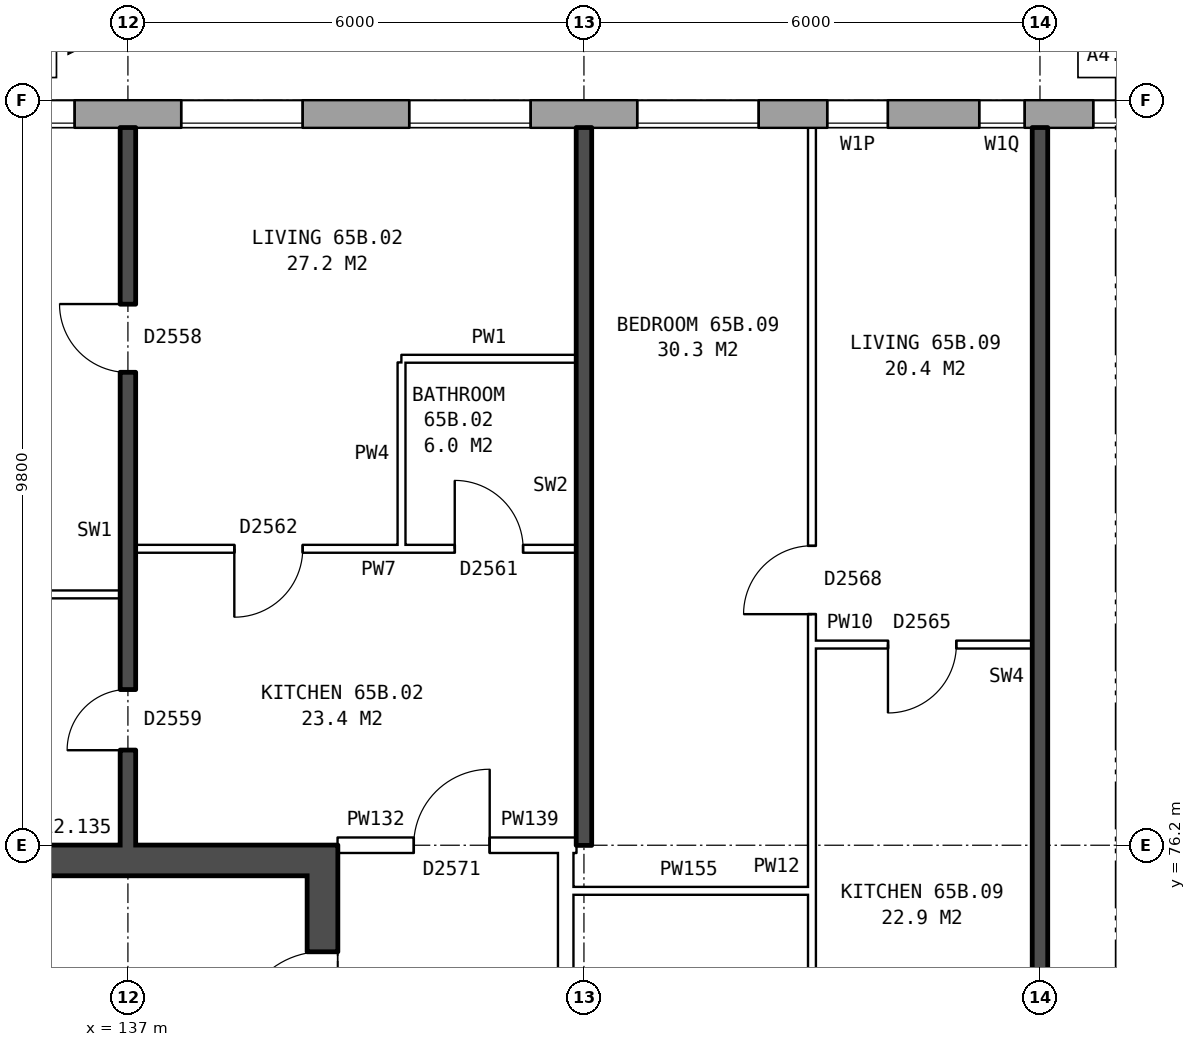
"""IFC4 building model, lengths in metres.
Left out: names, types, materials, properties, quantities, classifications, styles, units other than length and angle.
Written with IfcOpenShell. Run it as: python <this file> out.ifc"""

import sys

from ifc_helpers import new_model, si_unit, direction, frame, frame_2d, origin, place, context, subcontext, project, spatial, rectangle, extrude, element, fill, save


model = new_model("IFC4")
c1 = context("Model", 3, precision=1e-05, world=origin(), true_north=direction((0.0, 1.0)))
c2 = subcontext(c1, "Body", "Model", "MODEL_VIEW")
j1 = project(units=[si_unit("LENGTHUNIT", "METRE"), si_unit("PLANEANGLEUNIT", "RADIAN")], contexts=[c1])
p1 = place(None, origin())
s1 = spatial("IfcSite", under=j1, at=p1, CompositionType="ELEMENT")
p2 = place(p1, origin())
s2 = spatial("IfcBuilding", under=s1, at=p2, CompositionType="ELEMENT")
p3 = place(p2, frame((0.0, 0.0, 230.7)))
s3 = spatial("IfcBuildingStorey", under=s2, at=p3, CompositionType="ELEMENT", Elevation=230.7)
p4 = place(p3, frame((165.925, 85.82, 0.0), z_axis=(0.0, 0.0, 1.0), x_axis=(-1.0, 0.0, 0.0)))
e1 = element("IfcWall", 1, at=p4, inside=s3, PredefinedType="STANDARD", context=c2, shape_type="SweptSolid", body=[
    extrude(rectangle(XDim=33.875, YDim=0.36, at=frame_2d((16.938, 0.0))), origin(), (0.0, 0.0, 1.0), 2.85),
])
p5 = place(p4, frame((2.625, 0.0, 0.8)))
e2 = element("IfcOpeningElement", 2, at=p5, cuts=e1, PredefinedType="OPENING", context=c2, shape_type="SweptSolid", body=[
    extrude(rectangle(XDim=1.6, YDim=1.8, at=frame_2d((0.8, 0.9))), frame((0.0, 0.19, 0.0), z_axis=(0.0, -1.0, 0.0), x_axis=(1.0, 0.0, 0.0)), (0.0, 0.0, 1.0), 0.38),
])
p6 = place(p4, frame((5.625, 0.0, 0.8)))
e3 = element("IfcOpeningElement", 3, at=p6, cuts=e1, PredefinedType="OPENING", context=c2, shape_type="SweptSolid", body=[
    extrude(rectangle(XDim=1.6, YDim=1.8, at=frame_2d((0.8, 0.9))), frame((0.0, 0.19, 0.0), z_axis=(0.0, -1.0, 0.0), x_axis=(1.0, 0.0, 0.0)), (0.0, 0.0, 1.0), 0.38),
])
p7 = place(p4, frame((8.625, 0.0, 0.8)))
e4 = element("IfcOpeningElement", 4, at=p7, cuts=e1, PredefinedType="OPENING", context=c2, shape_type="SweptSolid", body=[
    extrude(rectangle(XDim=1.6, YDim=1.8, at=frame_2d((0.8, 0.9))), frame((0.0, 0.19, 0.0), z_axis=(0.0, -1.0, 0.0), x_axis=(1.0, 0.0, 0.0)), (0.0, 0.0, 1.0), 0.38),
])
p8 = place(p4, frame((11.125, 0.0, 0.8)))
e5 = element("IfcOpeningElement", 5, at=p8, cuts=e1, PredefinedType="OPENING", context=c2, shape_type="SweptSolid", body=[
    extrude(rectangle(XDim=1.4, YDim=1.8, at=frame_2d((0.7, 0.9))), frame((0.0, 0.19, 0.0), z_axis=(0.0, -1.0, 0.0), x_axis=(1.0, 0.0, 0.0)), (0.0, 0.0, 1.0), 0.38),
])
p9 = place(p4, frame((14.625, 0.0, 0.8)))
e6 = element("IfcOpeningElement", 6, at=p9, cuts=e1, PredefinedType="OPENING", context=c2, shape_type="SweptSolid", body=[
    extrude(rectangle(XDim=1.6, YDim=1.8, at=frame_2d((0.8, 0.9))), frame((0.0, 0.19, 0.0), z_axis=(0.0, -1.0, 0.0), x_axis=(1.0, 0.0, 0.0)), (0.0, 0.0, 1.0), 0.38),
])
p10 = place(p4, frame((17.125, 0.0, 0.25)))
e7 = element("IfcOpeningElement", 7, at=p10, cuts=e1, PredefinedType="OPENING", context=c2, shape_type="SweptSolid", body=[
    extrude(rectangle(XDim=0.6, YDim=1.2, at=frame_2d((0.3, 0.6))), frame((0.0, 0.19, 0.0), z_axis=(0.0, -1.0, 0.0), x_axis=(1.0, 0.0, 0.0)), (0.0, 0.0, 1.0), 0.38),
])
p11 = place(p4, frame((20.625, 0.0, 0.8)))
e8 = element("IfcOpeningElement", 8, at=p11, cuts=e1, PredefinedType="OPENING", context=c2, shape_type="SweptSolid", body=[
    extrude(rectangle(XDim=1.6, YDim=1.8, at=frame_2d((0.8, 0.9))), frame((0.0, 0.19, 0.0), z_axis=(0.0, -1.0, 0.0), x_axis=(1.0, 0.0, 0.0)), (0.0, 0.0, 1.0), 0.38),
])
p12 = place(p4, frame((23.625, 0.0, 0.8)))
e9 = element("IfcOpeningElement", 9, at=p12, cuts=e1, PredefinedType="OPENING", context=c2, shape_type="SweptSolid", body=[
    extrude(rectangle(XDim=1.6, YDim=1.8, at=frame_2d((0.8, 0.9))), frame((0.0, 0.19, 0.0), z_axis=(0.0, -1.0, 0.0), x_axis=(1.0, 0.0, 0.0)), (0.0, 0.0, 1.0), 0.38),
])
p13 = place(p4, frame((26.625, 0.0, 0.8)))
e10 = element("IfcOpeningElement", 10, at=p13, cuts=e1, PredefinedType="OPENING", context=c2, shape_type="SweptSolid", body=[
    extrude(rectangle(XDim=1.6, YDim=1.8, at=frame_2d((0.8, 0.9))), frame((0.0, 0.19, 0.0), z_axis=(0.0, -1.0, 0.0), x_axis=(1.0, 0.0, 0.0)), (0.0, 0.0, 1.0), 0.38),
])
p14 = place(p4, frame((29.625, 0.0, 0.8)))
e11 = element("IfcOpeningElement", 11, at=p14, cuts=e1, PredefinedType="OPENING", context=c2, shape_type="SweptSolid", body=[
    extrude(rectangle(XDim=1.6, YDim=1.8, at=frame_2d((0.8, 0.9))), frame((0.0, 0.19, 0.0), z_axis=(0.0, -1.0, 0.0), x_axis=(1.0, 0.0, 0.0)), (0.0, 0.0, 1.0), 0.38),
])
p15 = place(p4, frame((18.925, 0.0, 1.35)))
e12 = element("IfcOpeningElement", 12, at=p15, cuts=e1, PredefinedType="OPENING", context=c2, shape_type="SweptSolid", body=[
    extrude(rectangle(XDim=0.8, YDim=1.2, at=frame_2d((0.4, 0.6))), frame((0.0, 0.19, 0.0), z_axis=(0.0, -1.0, 0.0), x_axis=(1.0, 0.0, 0.0)), (0.0, 0.0, 1.0), 0.38),
])
p16 = place(p3, frame((139.56, 63.8, 0.0), z_axis=(0.0, 0.0, 1.0), x_axis=(0.0, 1.0, 0.0)))
e13 = element("IfcWall", 13, at=p16, inside=s3, PredefinedType="SHEAR", context=c2, shape_type="SweptSolid", body=[
    extrude(rectangle(XDim=12.4, YDim=0.4, at=frame_2d((6.2, 0.0))), origin(), (0.0, 0.0, 1.0), 2.85),
])
p17 = place(p16, frame((1.325, 0.0, 0.0)))
e14 = element("IfcOpeningElement", 14, at=p17, cuts=e13, PredefinedType="OPENING", context=c2, shape_type="SweptSolid", body=[
    extrude(rectangle(XDim=1.1, YDim=2.1, at=frame_2d((0.55, 1.05))), frame((0.0, 0.21, 0.0), z_axis=(0.0, -1.0, 0.0), x_axis=(1.0, 0.0, 0.0)), (0.0, 0.0, 1.0), 0.42),
])
p18 = place(p16, frame((3.6, 0.0, 0.0)))
e15 = element("IfcOpeningElement", 15, at=p18, cuts=e13, PredefinedType="OPENING", context=c2, shape_type="SweptSolid", body=[
    extrude(rectangle(XDim=1.1, YDim=2.1, at=frame_2d((0.55, 1.05))), frame((0.0, 0.21, 0.0), z_axis=(0.0, -1.0, 0.0), x_axis=(1.0, 0.0, 0.0)), (0.0, 0.0, 1.0), 0.42),
])
p19 = place(p16, frame((5.8, 0.0, 0.0)))
e16 = element("IfcOpeningElement", 16, at=p19, cuts=e13, PredefinedType="OPENING", context=c2, shape_type="SweptSolid", body=[
    extrude(rectangle(XDim=1.1, YDim=2.1, at=frame_2d((0.55, 1.05))), frame((0.0, 0.21, 0.0), z_axis=(0.0, -1.0, 0.0), x_axis=(1.0, 0.0, 0.0)), (0.0, 0.0, 1.0), 0.42),
])
p20 = place(p16, frame((9.9, 0.0, 0.0)))
e17 = element("IfcOpeningElement", 17, at=p20, cuts=e13, PredefinedType="OPENING", context=c2, shape_type="SweptSolid", body=[
    extrude(rectangle(XDim=1.1, YDim=2.1, at=frame_2d((0.55, 1.05))), frame((0.0, 0.21, 0.0), z_axis=(0.0, -1.0, 0.0), x_axis=(1.0, 0.0, 0.0)), (0.0, 0.0, 1.0), 0.42),
])
p21 = place(p16, frame((8.125, 0.0, 0.0)))
e18 = element("IfcOpeningElement", 18, at=p21, cuts=e13, PredefinedType="OPENING", context=c2, shape_type="SweptSolid", body=[
    extrude(rectangle(XDim=0.85, YDim=2.1, at=frame_2d((0.425, 1.05))), frame((0.0, 0.21, 0.0), z_axis=(0.0, -1.0, 0.0), x_axis=(1.0, 0.0, 0.0)), (0.0, 0.0, 1.0), 0.42),
])
p22 = place(p3, frame((139.36, 76.0, 0.0), z_axis=(0.0, 0.0, 1.0), x_axis=(-1.0, 0.0, 0.0)))
e19 = element("IfcWall", 19, at=p22, inside=s3, PredefinedType="SHEAR", context=c2, shape_type="SweptSolid", body=[
    extrude(rectangle(XDim=7.6, YDim=0.4, at=frame_2d((3.8, 0.0))), origin(), (0.0, 0.0, 1.0), 2.85),
])
p23 = place(p3, frame((142.76, 63.9, 0.0), z_axis=(0.0, 0.0, 1.0), x_axis=(0.0, 1.0, 0.0)))
e20 = element("IfcWall", 20, at=p23, inside=s3, PredefinedType="PARTITIONING", context=c2, shape_type="SweptSolid", body=[
    extrude(rectangle(XDim=12.2, YDim=0.2, at=frame_2d((6.1, 0.0))), origin(), (0.0, 0.0, 1.0), 2.85),
])
p24 = place(p23, frame((5.1, 0.0, 0.0)))
e21 = element("IfcOpeningElement", 21, at=p24, cuts=e20, PredefinedType="OPENING", context=c2, shape_type="SweptSolid", body=[
    extrude(rectangle(XDim=2.0, YDim=2.1, at=frame_2d((1.0, 1.05))), frame((0.0, 0.11, 0.0), z_axis=(0.0, -1.0, 0.0), x_axis=(1.0, 0.0, 0.0)), (0.0, 0.0, 1.0), 0.22),
])
p25 = place(p3, frame((142.76, 75.6, 0.0), z_axis=(0.0, 0.0, 1.0), x_axis=(1.0, 0.0, 0.0)))
e22 = element("IfcWall", 22, at=p25, inside=s3, PredefinedType="PARTITIONING", context=c2, shape_type="SweptSolid", body=[
    extrude(rectangle(XDim=3.24, YDim=0.1, at=frame_2d((1.62, 0.0))), origin(), (0.0, 0.0, 1.0), 2.85),
])
p26 = place(p3, frame((139.76, 76.2, 0.0), z_axis=(0.0, 0.0, 1.0), x_axis=(1.0, 0.0, 0.0)))
e23 = element("IfcWall", 23, at=p26, inside=s3, PredefinedType="PARTITIONING", context=c2, shape_type="SweptSolid", body=[
    extrude(rectangle(XDim=3.0, YDim=0.2, at=frame_2d((1.5, 0.0))), origin(), (0.0, 0.0, 1.0), 2.85),
])
p27 = place(p26, frame((1.0, 0.0, 0.0)))
e24 = element("IfcOpeningElement", 24, at=p27, cuts=e23, PredefinedType="OPENING", context=c2, shape_type="SweptSolid", body=[
    extrude(rectangle(XDim=1.0, YDim=2.1, at=frame_2d((0.5, 1.05))), frame((0.0, 0.11, 0.0), z_axis=(0.0, -1.0, 0.0), x_axis=(1.0, 0.0, 0.0)), (0.0, 0.0, 1.0), 0.22),
])
p28 = place(p3, frame((142.76, 76.2, 0.0), z_axis=(0.0, 0.0, 1.0), x_axis=(1.0, 0.0, 0.0)))
e25 = element("IfcWall", 25, at=p28, inside=s3, PredefinedType="PARTITIONING", context=c2, shape_type="SweptSolid", body=[
    extrude(rectangle(XDim=0.14, YDim=0.2, at=frame_2d((0.07, 0.0))), origin(), (0.0, 0.0, 1.0), 2.85),
])
p29 = place(p3, frame((146.0, 78.84, 0.0), z_axis=(0.0, 0.0, 1.0), x_axis=(1.0, 0.0, 0.0)))
e26 = element("IfcWall", 26, at=p29, inside=s3, PredefinedType="PARTITIONING", context=c2, shape_type="SweptSolid", body=[
    extrude(rectangle(XDim=2.9, YDim=0.1, at=frame_2d((1.45, 0.0))), origin(), (0.0, 0.0, 1.0), 2.85),
])
p30 = place(p29, frame((1.0, 0.0, 0.0)))
e27 = element("IfcOpeningElement", 27, at=p30, cuts=e26, PredefinedType="OPENING", context=c2, shape_type="SweptSolid", body=[
    extrude(rectangle(XDim=0.9, YDim=2.1, at=frame_2d((0.45, 1.05))), frame((0.0, 0.06, 0.0), z_axis=(0.0, -1.0, 0.0), x_axis=(1.0, 0.0, 0.0)), (0.0, 0.0, 1.0), 0.12),
])
p31 = place(p3, frame((131.1, 79.5, 0.0), z_axis=(0.0, 0.0, 1.0), x_axis=(1.0, 0.0, 0.0)))
e28 = element("IfcWall", 28, at=p31, inside=s3, PredefinedType="PARTITIONING", context=c2, shape_type="SweptSolid", body=[
    extrude(rectangle(XDim=5.8, YDim=0.1, at=frame_2d((2.9, 0.0))), origin(), (0.0, 0.0, 1.0), 2.85),
])
p32 = place(p3, frame((137.1, 80.1, 0.0), z_axis=(0.0, 0.0, 1.0), x_axis=(1.0, 0.0, 0.0)))
e29 = element("IfcWall", 29, at=p32, inside=s3, PredefinedType="PARTITIONING", context=c2, shape_type="SweptSolid", body=[
    extrude(rectangle(XDim=5.8, YDim=0.1, at=frame_2d((2.9, 0.0))), origin(), (0.0, 0.0, 1.0), 2.85),
])
p33 = place(p32, frame((1.3, 0.0, 0.0)))
e30 = element("IfcOpeningElement", 30, at=p33, cuts=e29, PredefinedType="OPENING", context=c2, shape_type="SweptSolid", body=[
    extrude(rectangle(XDim=0.9, YDim=2.1, at=frame_2d((0.45, 1.05))), frame((0.0, 0.06, 0.0), z_axis=(0.0, -1.0, 0.0), x_axis=(1.0, 0.0, 0.0)), (0.0, 0.0, 1.0), 0.12),
])
p34 = place(p32, frame((4.2, 0.0, 0.0)))
e31 = element("IfcOpeningElement", 31, at=p34, cuts=e29, PredefinedType="OPENING", context=c2, shape_type="SweptSolid", body=[
    extrude(rectangle(XDim=0.9, YDim=2.1, at=frame_2d((0.45, 1.05))), frame((0.0, 0.06, 0.0), z_axis=(0.0, -1.0, 0.0), x_axis=(1.0, 0.0, 0.0)), (0.0, 0.0, 1.0), 0.12),
])
p35 = place(p3, frame((140.6, 82.6, 0.0), z_axis=(0.0, 0.0, 1.0), x_axis=(1.0, 0.0, 0.0)))
e32 = element("IfcWall", 32, at=p35, inside=s3, PredefinedType="PARTITIONING", context=c2, shape_type="SweptSolid", body=[
    extrude(rectangle(XDim=2.3, YDim=0.1, at=frame_2d((1.15, 0.0))), origin(), (0.0, 0.0, 1.0), 2.85),
])
p36 = place(p3, frame((137.0, 76.2, 0.0), z_axis=(0.0, 0.0, 1.0), x_axis=(0.0, 1.0, 0.0)))
e33 = element("IfcWall", 33, at=p36, inside=s3, PredefinedType="SOLIDWALL", context=c2, shape_type="SweptSolid", body=[
    extrude(rectangle(XDim=9.44, YDim=0.2, at=frame_2d((4.72, 0.0))), origin(), (0.0, 0.0, 1.0), 2.85),
])
p37 = place(p36, frame((6.22, 0.0, 0.0)))
e34 = element("IfcOpeningElement", 34, at=p37, cuts=e33, PredefinedType="OPENING", context=c2, shape_type="SweptSolid", body=[
    extrude(rectangle(XDim=0.9, YDim=2.1, at=frame_2d((0.45, 1.05))), frame((0.0, 0.11, 0.0), z_axis=(0.0, -1.0, 0.0), x_axis=(1.0, 0.0, 0.0)), (0.0, 0.0, 1.0), 0.22),
])
p38 = place(p36, frame((1.25, 0.0, 0.0)))
e35 = element("IfcOpeningElement", 35, at=p38, cuts=e33, PredefinedType="OPENING", context=c2, shape_type="SweptSolid", body=[
    extrude(rectangle(XDim=0.8, YDim=2.1, at=frame_2d((0.4, 1.05))), frame((0.0, 0.11, 0.0), z_axis=(0.0, -1.0, 0.0), x_axis=(1.0, 0.0, 0.0)), (0.0, 0.0, 1.0), 0.22),
])
p39 = place(p3, frame((140.6, 80.15, 0.0), z_axis=(0.0, 0.0, 1.0), x_axis=(0.0, 1.0, 0.0)))
e36 = element("IfcWall", 36, at=p39, inside=s3, PredefinedType="PARTITIONING", context=c2, shape_type="SweptSolid", body=[
    extrude(rectangle(XDim=2.4, YDim=0.1, at=frame_2d((1.2, 0.0))), origin(), (0.0, 0.0, 1.0), 2.85),
])
p40 = place(p3, frame((143.0, 76.2, 0.0), z_axis=(0.0, 0.0, 1.0), x_axis=(0.0, 1.0, 0.0)))
e37 = element("IfcWall", 37, at=p40, inside=s3, PredefinedType="SOLIDWALL", context=c2, shape_type="SweptSolid", body=[
    extrude(rectangle(XDim=9.44, YDim=0.2, at=frame_2d((4.72, 0.0))), origin(), (0.0, 0.0, 1.0), 2.85),
])
p41 = place(p3, frame((146.0, 71.3, 0.0), z_axis=(0.0, 0.0, 1.0), x_axis=(0.0, 1.0, 0.0)))
e38 = element("IfcWall", 38, at=p41, inside=s3, PredefinedType="PARTITIONING", context=c2, shape_type="SweptSolid", body=[
    extrude(rectangle(XDim=14.34, YDim=0.1, at=frame_2d((7.17, 0.0))), origin(), (0.0, 0.0, 1.0), 2.85),
])
p42 = place(p41, frame((7.94, 0.0, 0.0)))
e39 = element("IfcOpeningElement", 39, at=p42, cuts=e38, PredefinedType="OPENING", context=c2, shape_type="SweptSolid", body=[
    extrude(rectangle(XDim=0.9, YDim=2.1, at=frame_2d((0.45, 1.05))), frame((0.0, 0.06, 0.0), z_axis=(0.0, -1.0, 0.0), x_axis=(1.0, 0.0, 0.0)), (0.0, 0.0, 1.0), 0.12),
])
p43 = place(p41, frame((0.4, 0.0, 0.0)))
e40 = element("IfcOpeningElement", 40, at=p43, cuts=e38, PredefinedType="OPENING", context=c2, shape_type="SweptSolid", body=[
    extrude(rectangle(XDim=0.9, YDim=2.1, at=frame_2d((0.45, 1.05))), frame((0.0, 0.06, 0.0), z_axis=(0.0, -1.0, 0.0), x_axis=(1.0, 0.0, 0.0)), (0.0, 0.0, 1.0), 0.12),
])
p44 = place(p3, frame((149.0, 71.2, 0.0), z_axis=(0.0, 0.0, 1.0), x_axis=(0.0, 1.0, 0.0)))
e41 = element("IfcWall", 41, at=p44, inside=s3, PredefinedType="SOLIDWALL", context=c2, shape_type="SweptSolid", body=[
    extrude(rectangle(XDim=14.44, YDim=0.2, at=frame_2d((7.22, 0.0))), origin(), (0.0, 0.0, 1.0), 2.85),
])
p45 = place(p9, origin())
e42 = element("IfcWindow", 42, at=p45, inside=s3, PartitioningType="SINGLE_PANEL", PredefinedType="WINDOW", context=c2, shape_type="SweptSolid", body=[
    extrude(rectangle(XDim=1.6, YDim=1.8, at=frame_2d((0.8, 0.9))), frame((0.0, 0.15, 0.0), z_axis=(0.0, -1.0, 0.0), x_axis=(1.0, 0.0, 0.0)), (0.0, 0.0, 1.0), 0.06),
])
fill(e6, e42)
p46 = place(p10, origin())
e43 = element("IfcWindow", 43, at=p46, inside=s3, PartitioningType="SINGLE_PANEL", PredefinedType="WINDOW", context=c2, shape_type="SweptSolid", body=[
    extrude(rectangle(XDim=0.6, YDim=1.2, at=frame_2d((0.3, 0.6))), frame((0.0, 0.15, 0.0), z_axis=(0.0, -1.0, 0.0), x_axis=(1.0, 0.0, 0.0)), (0.0, 0.0, 1.0), 0.06),
])
fill(e7, e43)
p47 = place(p11, origin())
e44 = element("IfcWindow", 44, at=p47, inside=s3, PartitioningType="SINGLE_PANEL", PredefinedType="WINDOW", context=c2, shape_type="SweptSolid", body=[
    extrude(rectangle(XDim=1.6, YDim=1.8, at=frame_2d((0.8, 0.9))), frame((0.0, 0.15, 0.0), z_axis=(0.0, -1.0, 0.0), x_axis=(1.0, 0.0, 0.0)), (0.0, 0.0, 1.0), 0.06),
])
fill(e8, e44)
p48 = place(p12, origin())
e45 = element("IfcWindow", 45, at=p48, inside=s3, PartitioningType="SINGLE_PANEL", PredefinedType="WINDOW", context=c2, shape_type="SweptSolid", body=[
    extrude(rectangle(XDim=1.6, YDim=1.8, at=frame_2d((0.8, 0.9))), frame((0.0, 0.15, 0.0), z_axis=(0.0, -1.0, 0.0), x_axis=(1.0, 0.0, 0.0)), (0.0, 0.0, 1.0), 0.06),
])
fill(e9, e45)
p49 = place(p13, origin())
e46 = element("IfcWindow", 46, at=p49, inside=s3, PartitioningType="SINGLE_PANEL", PredefinedType="WINDOW", context=c2, shape_type="SweptSolid", body=[
    extrude(rectangle(XDim=1.6, YDim=1.8, at=frame_2d((0.8, 0.9))), frame((0.0, 0.15, 0.0), z_axis=(0.0, -1.0, 0.0), x_axis=(1.0, 0.0, 0.0)), (0.0, 0.0, 1.0), 0.06),
])
fill(e10, e46)
p50 = place(p14, origin())
e47 = element("IfcWindow", 47, at=p50, inside=s3, PartitioningType="SINGLE_PANEL", PredefinedType="WINDOW", context=c2, shape_type="SweptSolid", body=[
    extrude(rectangle(XDim=1.6, YDim=1.8, at=frame_2d((0.8, 0.9))), frame((0.0, 0.15, 0.0), z_axis=(0.0, -1.0, 0.0), x_axis=(1.0, 0.0, 0.0)), (0.0, 0.0, 1.0), 0.06),
])
fill(e11, e47)
p51 = place(p20, origin())
e48 = element("IfcDoor", 48, at=p51, inside=s3, OperationType="SINGLE_SWING_LEFT", PredefinedType="DOOR", context=c2, shape_type="SweptSolid", body=[
    extrude(rectangle(XDim=1.1, YDim=2.1, at=frame_2d((0.55, 1.05))), frame((0.0, 0.185, 0.0), z_axis=(0.0, -1.0, 0.0), x_axis=(1.0, 0.0, 0.0)), (0.0, 0.0, 1.0), 0.05),
])
fill(e17, e48)
p52 = place(p37, origin())
e49 = element("IfcDoor", 49, at=p52, inside=s3, OperationType="SINGLE_SWING_RIGHT", PredefinedType="DOOR", context=c2, shape_type="SweptSolid", body=[
    extrude(rectangle(XDim=0.9, YDim=2.1, at=frame_2d((0.45, 1.05))), frame((0.0, 0.025, 0.0), z_axis=(0.0, -1.0, 0.0), x_axis=(1.0, 0.0, 0.0)), (0.0, 0.0, 1.0), 0.05),
])
fill(e34, e49)
p53 = place(p27, origin())
e50 = element("IfcDoor", 50, at=p53, inside=s3, OperationType="SINGLE_SWING_RIGHT", PredefinedType="DOOR", context=c2, shape_type="SweptSolid", body=[
    extrude(rectangle(XDim=1.0, YDim=2.1, at=frame_2d((0.5, 1.05))), frame((0.0, 0.025, 0.0), z_axis=(0.0, -1.0, 0.0), x_axis=(1.0, 0.0, 0.0)), (0.0, 0.0, 1.0), 0.05),
])
fill(e24, e50)
p54 = place(p33, frame((0.9, 0.0, 0.0), z_axis=(0.0, 0.0, 1.0), x_axis=(-1.0, 0.0, 0.0)))
e51 = element("IfcDoor", 51, at=p54, inside=s3, OperationType="SINGLE_SWING_RIGHT", PredefinedType="DOOR", context=c2, shape_type="SweptSolid", body=[
    extrude(rectangle(XDim=0.9, YDim=2.1, at=frame_2d((0.45, 1.05))), frame((0.0, 0.025, 0.0), z_axis=(0.0, -1.0, 0.0), x_axis=(1.0, 0.0, 0.0)), (0.0, 0.0, 1.0), 0.05),
])
fill(e30, e51)
p55 = place(p38, origin())
e52 = element("IfcDoor", 52, at=p55, inside=s3, OperationType="SINGLE_SWING_LEFT", PredefinedType="DOOR", context=c2, shape_type="SweptSolid", body=[
    extrude(rectangle(XDim=0.8, YDim=2.1, at=frame_2d((0.4, 1.05))), frame((0.0, 0.025, 0.0), z_axis=(0.0, -1.0, 0.0), x_axis=(1.0, 0.0, 0.0)), (0.0, 0.0, 1.0), 0.05),
])
fill(e35, e52)
p56 = place(p34, origin())
e53 = element("IfcDoor", 53, at=p56, inside=s3, OperationType="SINGLE_SWING_LEFT", PredefinedType="DOOR", context=c2, shape_type="SweptSolid", body=[
    extrude(rectangle(XDim=0.9, YDim=2.1, at=frame_2d((0.45, 1.05))), frame((0.0, 0.025, 0.0), z_axis=(0.0, -1.0, 0.0), x_axis=(1.0, 0.0, 0.0)), (0.0, 0.0, 1.0), 0.05),
])
fill(e31, e53)
p57 = place(p42, origin())
e54 = element("IfcDoor", 54, at=p57, inside=s3, OperationType="SINGLE_SWING_LEFT", PredefinedType="DOOR", context=c2, shape_type="SweptSolid", body=[
    extrude(rectangle(XDim=0.9, YDim=2.1, at=frame_2d((0.45, 1.05))), frame((0.0, 0.025, 0.0), z_axis=(0.0, -1.0, 0.0), x_axis=(1.0, 0.0, 0.0)), (0.0, 0.0, 1.0), 0.05),
])
fill(e39, e54)
p58 = place(p30, frame((0.9, 0.0, 0.0), z_axis=(0.0, 0.0, 1.0), x_axis=(-1.0, 0.0, 0.0)))
e55 = element("IfcDoor", 55, at=p58, inside=s3, OperationType="SINGLE_SWING_RIGHT", PredefinedType="DOOR", context=c2, shape_type="SweptSolid", body=[
    extrude(rectangle(XDim=0.9, YDim=2.1, at=frame_2d((0.45, 1.05))), frame((0.0, 0.025, 0.0), z_axis=(0.0, -1.0, 0.0), x_axis=(1.0, 0.0, 0.0)), (0.0, 0.0, 1.0), 0.05),
])
fill(e27, e55)
p59 = place(p15, origin())
e56 = element("IfcWindow", 56, at=p59, inside=s3, PartitioningType="SINGLE_PANEL", PredefinedType="WINDOW", context=c2, shape_type="SweptSolid", body=[
    extrude(rectangle(XDim=0.8, YDim=1.2, at=frame_2d((0.4, 0.6))), frame((0.0, 0.15, 0.0), z_axis=(0.0, -1.0, 0.0), x_axis=(1.0, 0.0, 0.0)), (0.0, 0.0, 1.0), 0.06),
])
fill(e12, e56)
save(model, sys.argv[1])
